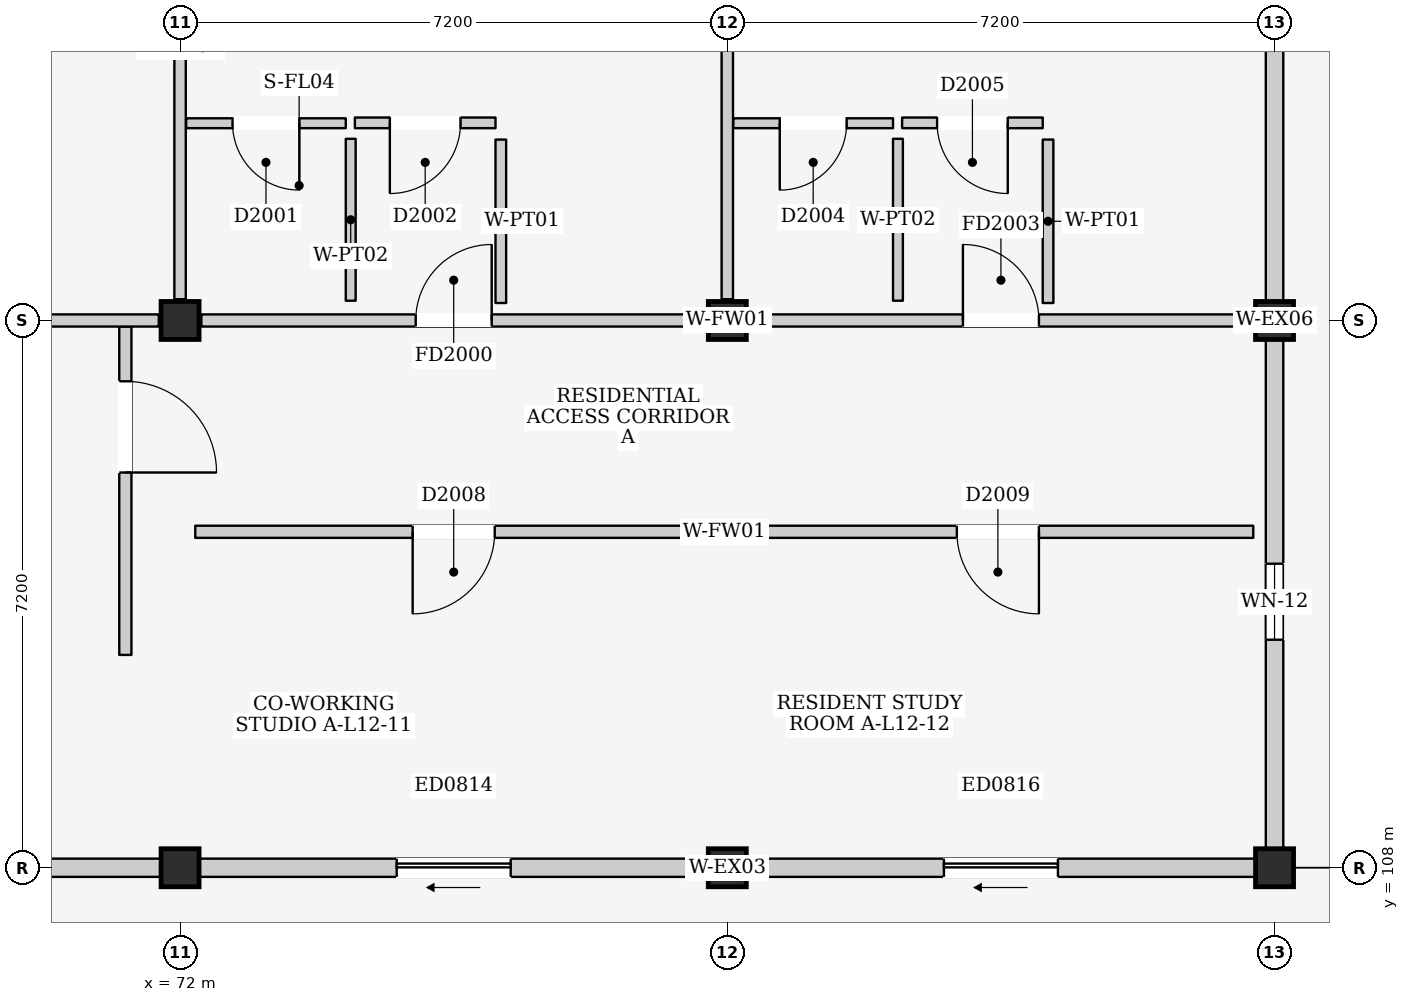
"""IFC4 building model, lengths in metres.
Left out: names, types, materials, properties, quantities, classifications, styles, units other than length and angle.
Written with IfcOpenShell. Run it as: python <this file> out.ifc"""

import sys

from ifc_helpers import new_model, si_unit, direction, frame, frame_2d, origin, origin_2d, place, context, subcontext, project, spatial, rectangle, extrude, element, fill, save


model = new_model("IFC4")
c1 = context("Model", 3, precision=1e-05, world=origin(), true_north=direction((0.0, 1.0)))
c2 = subcontext(c1, "Body", "Model", "MODEL_VIEW")
j1 = project(units=[si_unit("LENGTHUNIT", "METRE"), si_unit("PLANEANGLEUNIT", "RADIAN")], contexts=[c1])
p1 = place(None, origin())
s1 = spatial("IfcSite", under=j1, at=p1, CompositionType="ELEMENT")
p2 = place(p1, origin())
s2 = spatial("IfcBuilding", under=s1, at=p2, CompositionType="ELEMENT")
p3 = place(p2, frame((0.0, 0.0, 41.2)))
s3 = spatial("IfcBuildingStorey", under=s2, at=p3, CompositionType="ELEMENT", Elevation=41.2)
for number, where, z_axis, x_axis in (
    (1, (72.0, 108.0, 0.0), (0.0, 0.0, 1.0), (1.0, 0.0, 0.0)),
    (2, (72.0, 115.2, 0.0), (0.0, 0.0, 1.0), (1.0, 0.0, 0.0)),
    (3, (79.2, 108.0, 0.0), (0.0, 0.0, 1.0), (1.0, 0.0, 0.0)),
    (4, (79.2, 115.2, 0.0), (0.0, 0.0, 1.0), (1.0, 0.0, 0.0)),
    (5, (86.4, 108.0, 0.0), (0.0, 0.0, 1.0), (1.0, 0.0, 0.0)),
    (6, (86.4, 115.2, 0.0), (0.0, 0.0, 1.0), (1.0, 0.0, 0.0)),
):
    element("IfcColumn", number, at=place(p3, frame(where, z_axis=z_axis, x_axis=x_axis)), inside=s3, PredefinedType="COLUMN", context=c2, shape_type="SweptSolid", body=[
        extrude(rectangle(XDim=0.5, YDim=0.5, at=origin_2d()), origin(), (0.0, 0.0, 1.0), 3.2),
    ])
p4 = place(p3, frame((65.05, 108.0, 0.0), z_axis=(0.0, 0.0, 1.0), x_axis=(1.0, 0.0, 0.0)))
e7 = element("IfcWall", 7, at=p4, inside=s3, PredefinedType="ELEMENTEDWALL", context=c2, shape_type="SweptSolid", body=[
    extrude(rectangle(XDim=6.7, YDim=0.24, at=frame_2d((3.35, 0.0))), origin(), (0.0, 0.0, 1.0), 2.285),
])
p5 = place(p4, frame((2.85, 0.0, 1.2)))
e8 = element("IfcOpeningElement", 8, at=p5, cuts=e7, PredefinedType="OPENING", context=c2, shape_type="SweptSolid", body=[
    extrude(rectangle(XDim=1.0, YDim=0.9, at=frame_2d((0.5, 0.45))), frame((0.0, 0.135, 0.0), z_axis=(0.0, -1.0, 0.0), x_axis=(1.0, 0.0, 0.0)), (0.0, 0.0, 1.0), 0.27),
])
p6 = place(p3, frame((72.25, 108.0, 0.0), z_axis=(0.0, 0.0, 1.0), x_axis=(1.0, 0.0, 0.0)))
e9 = element("IfcWall", 9, at=p6, inside=s3, PredefinedType="ELEMENTEDWALL", context=c2, shape_type="SweptSolid", body=[
    extrude(rectangle(XDim=6.7, YDim=0.24, at=frame_2d((3.35, 0.0))), origin(), (0.0, 0.0, 1.0), 2.285),
])
p7 = place(p6, frame((2.6, 0.0, 0.0)))
e10 = element("IfcOpeningElement", 10, at=p7, cuts=e9, PredefinedType="OPENING", context=c2, shape_type="SweptSolid", body=[
    extrude(rectangle(XDim=1.5, YDim=2.12, at=frame_2d((0.75, 1.06))), frame((0.0, 0.135, 0.0), z_axis=(0.0, -1.0, 0.0), x_axis=(1.0, 0.0, 0.0)), (0.0, 0.0, 1.0), 0.27),
])
p8 = place(p3, frame((79.45, 108.0, 0.0), z_axis=(0.0, 0.0, 1.0), x_axis=(1.0, 0.0, 0.0)))
e11 = element("IfcWall", 11, at=p8, inside=s3, PredefinedType="ELEMENTEDWALL", context=c2, shape_type="SweptSolid", body=[
    extrude(rectangle(XDim=6.7, YDim=0.24, at=frame_2d((3.35, 0.0))), origin(), (0.0, 0.0, 1.0), 2.285),
])
p9 = place(p8, frame((2.6, 0.0, 0.0)))
e12 = element("IfcOpeningElement", 12, at=p9, cuts=e11, PredefinedType="OPENING", context=c2, shape_type="SweptSolid", body=[
    extrude(rectangle(XDim=1.5, YDim=2.12, at=frame_2d((0.75, 1.06))), frame((0.0, 0.135, 0.0), z_axis=(0.0, -1.0, 0.0), x_axis=(1.0, 0.0, 0.0)), (0.0, 0.0, 1.0), 0.27),
])
p10 = place(p3, frame((86.4, 108.25, 0.0), z_axis=(0.0, 0.0, 1.0), x_axis=(0.0, 1.0, 0.0)))
e13 = element("IfcWall", 13, at=p10, inside=s3, PredefinedType="ELEMENTEDWALL", context=c2, shape_type="SweptSolid", body=[
    extrude(rectangle(XDim=6.7, YDim=0.23, at=frame_2d((3.35, 0.0))), origin(), (0.0, 0.0, 1.0), 2.435),
])
p11 = place(p10, frame((2.75, 0.0, 1.1)))
e14 = element("IfcOpeningElement", 14, at=p11, cuts=e13, PredefinedType="OPENING", context=c2, shape_type="SweptSolid", body=[
    extrude(rectangle(XDim=1.0, YDim=0.9, at=frame_2d((0.5, 0.45))), frame((0.0, 0.13, 0.0), z_axis=(0.0, -1.0, 0.0), x_axis=(1.0, 0.0, 0.0)), (0.0, 0.0, 1.0), 0.26),
])
p12 = place(p3, frame((86.4, 115.45, 0.0), z_axis=(0.0, 0.0, 1.0), x_axis=(0.0, 1.0, 0.0)))
e15 = element("IfcWall", 15, at=p12, inside=s3, PredefinedType="ELEMENTEDWALL", context=c2, shape_type="SweptSolid", body=[
    extrude(rectangle(XDim=6.7, YDim=0.23, at=frame_2d((3.35, 0.0))), origin(), (0.0, 0.0, 1.0), 2.435),
])
p13 = place(p12, frame((3.6, 0.0, 0.0)))
e16 = element("IfcOpeningElement", 16, at=p13, cuts=e15, PredefinedType="OPENING", context=c2, shape_type="SweptSolid", body=[
    extrude(rectangle(XDim=1.08, YDim=2.12, at=frame_2d((0.54, 1.06))), frame((0.0, 0.13, 0.0), z_axis=(0.0, -1.0, 0.0), x_axis=(1.0, 0.0, 0.0)), (0.0, 0.0, 1.0), 0.26),
])
p14 = place(p3, frame((71.28, 110.8, 0.0), z_axis=(0.0, 0.0, 1.0), x_axis=(0.0, 1.0, 0.0)))
e17 = element("IfcWall", 17, at=p14, inside=s3, PredefinedType="PARTITIONING", context=c2, shape_type="SweptSolid", body=[
    extrude(rectangle(XDim=4.32, YDim=0.16, at=frame_2d((2.16, 0.0))), origin(), (0.0, 0.0, 1.0), 2.95),
])
p15 = place(p14, frame((2.4, 0.0, 0.0)))
e18 = element("IfcOpeningElement", 18, at=p15, cuts=e17, PredefinedType="OPENING", context=c2, shape_type="SweptSolid", body=[
    extrude(rectangle(XDim=1.2, YDim=2.2, at=frame_2d((0.6, 1.1))), frame((0.0, 0.095, 0.0), z_axis=(0.0, -1.0, 0.0), x_axis=(1.0, 0.0, 0.0)), (0.0, 0.0, 1.0), 0.19),
])
p16 = place(p3, frame((65.08, 115.2, 0.0), z_axis=(0.0, 0.0, 1.0), x_axis=(1.0, 0.0, 0.0)))
e19 = element("IfcWall", 19, at=p16, inside=s3, PredefinedType="PARTITIONING", context=c2, shape_type="SweptSolid", body=[
    extrude(rectangle(XDim=6.64, YDim=0.16, at=frame_2d((3.32, 0.0))), origin(), (0.0, 0.0, 1.0), 2.285),
])
p17 = place(p16, frame((2.82, 0.0, 0.0)))
e20 = element("IfcOpeningElement", 20, at=p17, cuts=e19, PredefinedType="OPENING", context=c2, shape_type="SweptSolid", body=[
    extrude(rectangle(XDim=1.0, YDim=2.15, at=frame_2d((0.5, 1.075))), frame((0.0, 0.095, 0.0), z_axis=(0.0, -1.0, 0.0), x_axis=(1.0, 0.0, 0.0)), (0.0, 0.0, 1.0), 0.19),
])
p18 = place(p3, frame((72.0, 115.48, 0.0), z_axis=(0.0, 0.0, 1.0), x_axis=(0.0, 1.0, 0.0)))
e21 = element("IfcWall", 21, at=p18, inside=s3, PredefinedType="PARTITIONING", context=c2, shape_type="SweptSolid", body=[
    extrude(rectangle(XDim=6.64, YDim=0.15, at=frame_2d((3.32, 0.0))), origin(), (0.0, 0.0, 1.0), 2.435),
])
p19 = place(p3, frame((72.28, 115.2, 0.0), z_axis=(0.0, 0.0, 1.0), x_axis=(1.0, 0.0, 0.0)))
e22 = element("IfcWall", 22, at=p19, inside=s3, PredefinedType="PARTITIONING", context=c2, shape_type="SweptSolid", body=[
    extrude(rectangle(XDim=6.64, YDim=0.16, at=frame_2d((3.32, 0.0))), origin(), (0.0, 0.0, 1.0), 2.285),
])
p20 = place(p19, frame((2.82, 0.0, 0.0)))
e23 = element("IfcOpeningElement", 23, at=p20, cuts=e22, PredefinedType="OPENING", context=c2, shape_type="SweptSolid", body=[
    extrude(rectangle(XDim=1.0, YDim=2.15, at=frame_2d((0.5, 1.075))), frame((0.0, 0.095, 0.0), z_axis=(0.0, -1.0, 0.0), x_axis=(1.0, 0.0, 0.0)), (0.0, 0.0, 1.0), 0.19),
])
p21 = place(p3, frame((79.2, 115.48, 0.0), z_axis=(0.0, 0.0, 1.0), x_axis=(0.0, 1.0, 0.0)))
e24 = element("IfcWall", 24, at=p21, inside=s3, PredefinedType="PARTITIONING", context=c2, shape_type="SweptSolid", body=[
    extrude(rectangle(XDim=6.64, YDim=0.15, at=frame_2d((3.32, 0.0))), origin(), (0.0, 0.0, 1.0), 2.435),
])
p22 = place(p3, frame((72.08, 117.795, 0.0), z_axis=(0.0, 0.0, 1.0), x_axis=(1.0, 0.0, 0.0)))
e25 = element("IfcWall", 25, at=p22, inside=s3, PredefinedType="PARTITIONING", context=c2, shape_type="SweptSolid", body=[
    extrude(rectangle(XDim=2.1, YDim=0.13, at=frame_2d((1.05, 0.0))), origin(), (0.0, 0.0, 1.0), 2.95),
])
p23 = place(p22, frame((0.61, 0.0, 0.0)))
e26 = element("IfcOpeningElement", 26, at=p23, cuts=e25, PredefinedType="OPENING", context=c2, shape_type="SweptSolid", body=[
    extrude(rectangle(XDim=0.88, YDim=2.1, at=frame_2d((0.44, 1.05))), frame((0.0, 0.08, 0.0), z_axis=(0.0, -1.0, 0.0), x_axis=(1.0, 0.0, 0.0)), (0.0, 0.0, 1.0), 0.16),
])
p24 = place(p3, frame((74.245, 115.46, 0.0), z_axis=(0.0, 0.0, 1.0), x_axis=(0.0, 1.0, 0.0)))
e27 = element("IfcWall", 27, at=p24, inside=s3, PredefinedType="PARTITIONING", context=c2, shape_type="SweptSolid", body=[
    extrude(rectangle(XDim=2.13, YDim=0.13, at=frame_2d((1.065, 0.0))), origin(), (0.0, 0.0, 1.0), 2.95),
])
p25 = place(p3, frame((74.3, 117.8, 0.0), z_axis=(0.0, 0.0, 1.0), x_axis=(1.0, 0.0, 0.0)))
e28 = element("IfcWall", 28, at=p25, inside=s3, PredefinedType="PARTITIONING", context=c2, shape_type="SweptSolid", body=[
    extrude(rectangle(XDim=1.85, YDim=0.14, at=frame_2d((0.925, 0.0))), origin(), (0.0, 0.0, 1.0), 2.95),
])
p26 = place(p25, frame((0.46, 0.0, 0.0)))
e29 = element("IfcOpeningElement", 29, at=p26, cuts=e28, PredefinedType="OPENING", context=c2, shape_type="SweptSolid", body=[
    extrude(rectangle(XDim=0.93, YDim=2.14, at=frame_2d((0.465, 1.07))), frame((0.0, 0.085, 0.0), z_axis=(0.0, -1.0, 0.0), x_axis=(1.0, 0.0, 0.0)), (0.0, 0.0, 1.0), 0.17),
])
p27 = place(p3, frame((76.22, 115.43, 0.0), z_axis=(0.0, 0.0, 1.0), x_axis=(0.0, 1.0, 0.0)))
e30 = element("IfcWall", 30, at=p27, inside=s3, PredefinedType="PARTITIONING", context=c2, shape_type="SweptSolid", body=[
    extrude(rectangle(XDim=2.15, YDim=0.14, at=frame_2d((1.075, 0.0))), origin(), (0.0, 0.0, 1.0), 2.95),
])
p28 = place(p3, frame((79.48, 115.2, 0.0), z_axis=(0.0, 0.0, 1.0), x_axis=(1.0, 0.0, 0.0)))
e31 = element("IfcWall", 31, at=p28, inside=s3, PredefinedType="PARTITIONING", context=c2, shape_type="SweptSolid", body=[
    extrude(rectangle(XDim=6.64, YDim=0.16, at=frame_2d((3.32, 0.0))), origin(), (0.0, 0.0, 1.0), 2.285),
])
p29 = place(p28, frame((2.82, 0.0, 0.0)))
e32 = element("IfcOpeningElement", 32, at=p29, cuts=e31, PredefinedType="OPENING", context=c2, shape_type="SweptSolid", body=[
    extrude(rectangle(XDim=1.0, YDim=2.15, at=frame_2d((0.5, 1.075))), frame((0.0, 0.095, 0.0), z_axis=(0.0, -1.0, 0.0), x_axis=(1.0, 0.0, 0.0)), (0.0, 0.0, 1.0), 0.19),
])
p30 = place(p3, frame((79.28, 117.795, 0.0), z_axis=(0.0, 0.0, 1.0), x_axis=(1.0, 0.0, 0.0)))
e33 = element("IfcWall", 33, at=p30, inside=s3, PredefinedType="PARTITIONING", context=c2, shape_type="SweptSolid", body=[
    extrude(rectangle(XDim=2.1, YDim=0.13, at=frame_2d((1.05, 0.0))), origin(), (0.0, 0.0, 1.0), 2.95),
])
p31 = place(p30, frame((0.61, 0.0, 0.0)))
e34 = element("IfcOpeningElement", 34, at=p31, cuts=e33, PredefinedType="OPENING", context=c2, shape_type="SweptSolid", body=[
    extrude(rectangle(XDim=0.88, YDim=2.1, at=frame_2d((0.44, 1.05))), frame((0.0, 0.08, 0.0), z_axis=(0.0, -1.0, 0.0), x_axis=(1.0, 0.0, 0.0)), (0.0, 0.0, 1.0), 0.16),
])
p32 = place(p3, frame((81.445, 115.46, 0.0), z_axis=(0.0, 0.0, 1.0), x_axis=(0.0, 1.0, 0.0)))
e35 = element("IfcWall", 35, at=p32, inside=s3, PredefinedType="PARTITIONING", context=c2, shape_type="SweptSolid", body=[
    extrude(rectangle(XDim=2.13, YDim=0.13, at=frame_2d((1.065, 0.0))), origin(), (0.0, 0.0, 1.0), 2.95),
])
p33 = place(p3, frame((81.5, 117.8, 0.0), z_axis=(0.0, 0.0, 1.0), x_axis=(1.0, 0.0, 0.0)))
e36 = element("IfcWall", 36, at=p33, inside=s3, PredefinedType="PARTITIONING", context=c2, shape_type="SweptSolid", body=[
    extrude(rectangle(XDim=1.85, YDim=0.14, at=frame_2d((0.925, 0.0))), origin(), (0.0, 0.0, 1.0), 2.95),
])
p34 = place(p33, frame((0.46, 0.0, 0.0)))
e37 = element("IfcOpeningElement", 37, at=p34, cuts=e36, PredefinedType="OPENING", context=c2, shape_type="SweptSolid", body=[
    extrude(rectangle(XDim=0.93, YDim=2.14, at=frame_2d((0.465, 1.07))), frame((0.0, 0.085, 0.0), z_axis=(0.0, -1.0, 0.0), x_axis=(1.0, 0.0, 0.0)), (0.0, 0.0, 1.0), 0.17),
])
p35 = place(p3, frame((83.42, 115.43, 0.0), z_axis=(0.0, 0.0, 1.0), x_axis=(0.0, 1.0, 0.0)))
e38 = element("IfcWall", 38, at=p35, inside=s3, PredefinedType="PARTITIONING", context=c2, shape_type="SweptSolid", body=[
    extrude(rectangle(XDim=2.15, YDim=0.14, at=frame_2d((1.075, 0.0))), origin(), (0.0, 0.0, 1.0), 2.95),
])
p36 = place(p3, frame((72.2, 112.42, 0.0), z_axis=(0.0, 0.0, 1.0), x_axis=(1.0, 0.0, 0.0)))
e39 = element("IfcWall", 39, at=p36, inside=s3, PredefinedType="PARTITIONING", context=c2, shape_type="SweptSolid", body=[
    extrude(rectangle(XDim=6.8, YDim=0.16, at=frame_2d((3.4, 0.0))), origin(), (0.0, 0.0, 1.0), 2.95),
])
p37 = place(p36, frame((2.86, 0.0, 0.0)))
e40 = element("IfcOpeningElement", 40, at=p37, cuts=e39, PredefinedType="OPENING", context=c2, shape_type="SweptSolid", body=[
    extrude(rectangle(XDim=1.08, YDim=2.22, at=frame_2d((0.54, 1.11))), frame((0.0, 0.095, 0.0), z_axis=(0.0, -1.0, 0.0), x_axis=(1.0, 0.0, 0.0)), (0.0, 0.0, 1.0), 0.19),
])
p38 = place(p3, frame((79.4, 112.42, 0.0), z_axis=(0.0, 0.0, 1.0), x_axis=(1.0, 0.0, 0.0)))
e41 = element("IfcWall", 41, at=p38, inside=s3, PredefinedType="PARTITIONING", context=c2, shape_type="SweptSolid", body=[
    extrude(rectangle(XDim=6.72, YDim=0.16, at=frame_2d((3.36, 0.0))), origin(), (0.0, 0.0, 1.0), 2.95),
])
p39 = place(p38, frame((2.82, 0.0, 0.0)))
e42 = element("IfcOpeningElement", 42, at=p39, cuts=e41, PredefinedType="OPENING", context=c2, shape_type="SweptSolid", body=[
    extrude(rectangle(XDim=1.08, YDim=2.22, at=frame_2d((0.54, 1.11))), frame((0.0, 0.095, 0.0), z_axis=(0.0, -1.0, 0.0), x_axis=(1.0, 0.0, 0.0)), (0.0, 0.0, 1.0), 0.19),
])
p40 = place(p7, frame((1.5, 0.0, 0.0), z_axis=(0.0, 0.0, 1.0), x_axis=(-1.0, 0.0, 0.0)))
e43 = element("IfcDoor", 43, at=p40, inside=s3, OperationType="SLIDING_TO_LEFT", PredefinedType="DOOR", context=c2, shape_type="SweptSolid", body=[
    extrude(rectangle(XDim=1.5, YDim=2.12, at=frame_2d((0.75, 1.06))), frame((0.0, 0.025, 0.0), z_axis=(0.0, -1.0, 0.0), x_axis=(1.0, 0.0, 0.0)), (0.0, 0.0, 1.0), 0.05),
])
fill(e10, e43)
p41 = place(p9, frame((1.5, 0.0, 0.0), z_axis=(0.0, 0.0, 1.0), x_axis=(-1.0, 0.0, 0.0)))
e44 = element("IfcDoor", 44, at=p41, inside=s3, OperationType="SLIDING_TO_LEFT", PredefinedType="DOOR", context=c2, shape_type="SweptSolid", body=[
    extrude(rectangle(XDim=1.5, YDim=2.12, at=frame_2d((0.75, 1.06))), frame((0.0, 0.025, 0.0), z_axis=(0.0, -1.0, 0.0), x_axis=(1.0, 0.0, 0.0)), (0.0, 0.0, 1.0), 0.05),
])
fill(e12, e44)
p42 = place(p11, origin())
e45 = element("IfcWindow", 45, at=p42, inside=s3, PartitioningType="SINGLE_PANEL", PredefinedType="WINDOW", context=c2, shape_type="SweptSolid", body=[
    extrude(rectangle(XDim=1.0, YDim=0.9, at=frame_2d((0.5, 0.45))), frame((0.0, 0.03, 0.0), z_axis=(0.0, -1.0, 0.0), x_axis=(1.0, 0.0, 0.0)), (0.0, 0.0, 1.0), 0.06),
])
fill(e14, e45)
p43 = place(p15, frame((1.2, 0.0, 0.0), z_axis=(0.0, 0.0, 1.0), x_axis=(-1.0, 0.0, 0.0)))
e46 = element("IfcDoor", 46, at=p43, inside=s3, OperationType="SINGLE_SWING_RIGHT", PredefinedType="DOOR", context=c2, shape_type="SweptSolid", body=[
    extrude(rectangle(XDim=1.2, YDim=2.2, at=frame_2d((0.6, 1.1))), frame((0.0, 0.025, 0.0), z_axis=(0.0, -1.0, 0.0), x_axis=(1.0, 0.0, 0.0)), (0.0, 0.0, 1.0), 0.05),
])
fill(e18, e46)
p44 = place(p20, origin())
e47 = element("IfcDoor", 47, at=p44, inside=s3, OperationType="SINGLE_SWING_RIGHT", PredefinedType="DOOR", context=c2, shape_type="SweptSolid", body=[
    extrude(rectangle(XDim=1.0, YDim=2.15, at=frame_2d((0.5, 1.075))), frame((0.0, 0.025, 0.0), z_axis=(0.0, -1.0, 0.0), x_axis=(1.0, 0.0, 0.0)), (0.0, 0.0, 1.0), 0.05),
])
fill(e23, e47)
p45 = place(p23, frame((0.88, 0.0, 0.0), z_axis=(0.0, 0.0, 1.0), x_axis=(-1.0, 0.0, 0.0)))
e48 = element("IfcDoor", 48, at=p45, inside=s3, OperationType="SINGLE_SWING_LEFT", PredefinedType="DOOR", context=c2, shape_type="SweptSolid", body=[
    extrude(rectangle(XDim=0.88, YDim=2.1, at=frame_2d((0.44, 1.05))), frame((0.0, 0.025, 0.0), z_axis=(0.0, -1.0, 0.0), x_axis=(1.0, 0.0, 0.0)), (0.0, 0.0, 1.0), 0.05),
])
fill(e26, e48)
p46 = place(p26, frame((0.93, 0.0, 0.0), z_axis=(0.0, 0.0, 1.0), x_axis=(-1.0, 0.0, 0.0)))
e49 = element("IfcDoor", 49, at=p46, inside=s3, OperationType="SINGLE_SWING_RIGHT", PredefinedType="DOOR", context=c2, shape_type="SweptSolid", body=[
    extrude(rectangle(XDim=0.93, YDim=2.14, at=frame_2d((0.465, 1.07))), frame((0.0, 0.025, 0.0), z_axis=(0.0, -1.0, 0.0), x_axis=(1.0, 0.0, 0.0)), (0.0, 0.0, 1.0), 0.05),
])
fill(e29, e49)
p47 = place(p29, origin())
e50 = element("IfcDoor", 50, at=p47, inside=s3, OperationType="SINGLE_SWING_LEFT", PredefinedType="DOOR", context=c2, shape_type="SweptSolid", body=[
    extrude(rectangle(XDim=1.0, YDim=2.15, at=frame_2d((0.5, 1.075))), frame((0.0, 0.025, 0.0), z_axis=(0.0, -1.0, 0.0), x_axis=(1.0, 0.0, 0.0)), (0.0, 0.0, 1.0), 0.05),
])
fill(e32, e50)
p48 = place(p31, frame((0.88, 0.0, 0.0), z_axis=(0.0, 0.0, 1.0), x_axis=(-1.0, 0.0, 0.0)))
e51 = element("IfcDoor", 51, at=p48, inside=s3, OperationType="SINGLE_SWING_RIGHT", PredefinedType="DOOR", context=c2, shape_type="SweptSolid", body=[
    extrude(rectangle(XDim=0.88, YDim=2.1, at=frame_2d((0.44, 1.05))), frame((0.0, 0.025, 0.0), z_axis=(0.0, -1.0, 0.0), x_axis=(1.0, 0.0, 0.0)), (0.0, 0.0, 1.0), 0.05),
])
fill(e34, e51)
p49 = place(p34, frame((0.93, 0.0, 0.0), z_axis=(0.0, 0.0, 1.0), x_axis=(-1.0, 0.0, 0.0)))
e52 = element("IfcDoor", 52, at=p49, inside=s3, OperationType="SINGLE_SWING_LEFT", PredefinedType="DOOR", context=c2, shape_type="SweptSolid", body=[
    extrude(rectangle(XDim=0.93, YDim=2.14, at=frame_2d((0.465, 1.07))), frame((0.0, 0.025, 0.0), z_axis=(0.0, -1.0, 0.0), x_axis=(1.0, 0.0, 0.0)), (0.0, 0.0, 1.0), 0.05),
])
fill(e37, e52)
p50 = place(p37, frame((1.08, 0.0, 0.0), z_axis=(0.0, 0.0, 1.0), x_axis=(-1.0, 0.0, 0.0)))
e53 = element("IfcDoor", 53, at=p50, inside=s3, OperationType="SINGLE_SWING_RIGHT", PredefinedType="DOOR", context=c2, shape_type="SweptSolid", body=[
    extrude(rectangle(XDim=1.08, YDim=2.22, at=frame_2d((0.54, 1.11))), frame((0.0, 0.025, 0.0), z_axis=(0.0, -1.0, 0.0), x_axis=(1.0, 0.0, 0.0)), (0.0, 0.0, 1.0), 0.05),
])
fill(e40, e53)
p51 = place(p39, frame((1.08, 0.0, 0.0), z_axis=(0.0, 0.0, 1.0), x_axis=(-1.0, 0.0, 0.0)))
e54 = element("IfcDoor", 54, at=p51, inside=s3, OperationType="SINGLE_SWING_LEFT", PredefinedType="DOOR", context=c2, shape_type="SweptSolid", body=[
    extrude(rectangle(XDim=1.08, YDim=2.22, at=frame_2d((0.54, 1.11))), frame((0.0, 0.025, 0.0), z_axis=(0.0, -1.0, 0.0), x_axis=(1.0, 0.0, 0.0)), (0.0, 0.0, 1.0), 0.05),
])
fill(e42, e54)
save(model, sys.argv[1])
